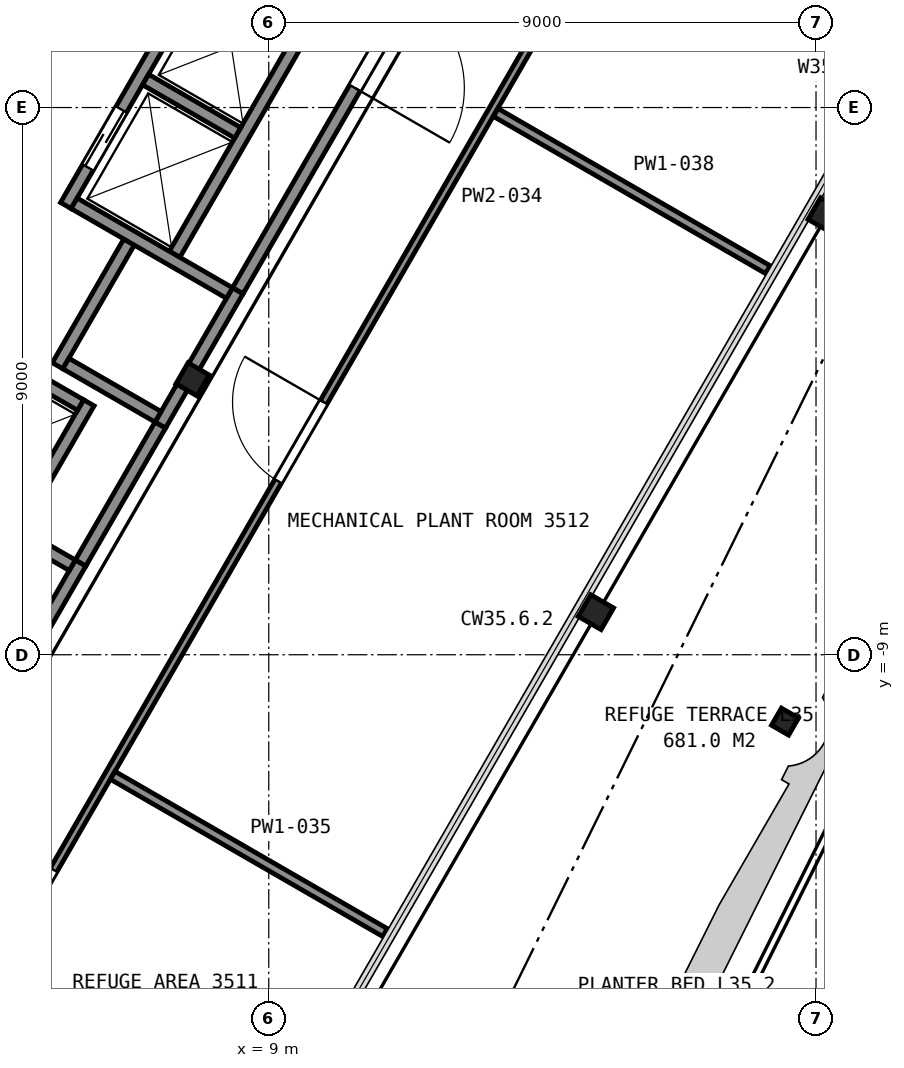
"""IFC4 building model, lengths in metres.
Left out: names, types, materials, properties, quantities, classifications, styles, units other than length and angle.
Written with IfcOpenShell. Run it as: python <this file> out.ifc"""

import sys

from ifc_helpers import new_model, si_unit, direction, frame, frame_2d, origin, origin_2d, place, context, subcontext, project, spatial, rectangle, hollow_circle, i_section, extrude, element, fill, save


model = new_model("IFC4")
c1 = context("Model", 3, precision=1e-05, world=origin(), true_north=direction((0.0, 1.0)))
c2 = subcontext(c1, "Body", "Model", "MODEL_VIEW")
j1 = project(units=[si_unit("LENGTHUNIT", "METRE"), si_unit("PLANEANGLEUNIT", "RADIAN")], contexts=[c1])
p1 = place(None, origin())
s1 = spatial("IfcSite", under=j1, at=p1, CompositionType="ELEMENT")
p2 = place(p1, origin())
s2 = spatial("IfcBuilding", under=s1, at=p2, CompositionType="ELEMENT")
p3 = place(p2, frame((0.0, 0.0, 143.2)))
s3 = spatial("IfcBuildingStorey", under=s2, at=p3, CompositionType="ELEMENT", Elevation=143.2)
for number, where, z_axis, x_axis in (
    (1, (14.38, -8.3, -0.16), (0.0, 0.0, 1.0), (-0.5, -0.866, 0.0)),
    (2, (18.16, -1.77, -0.16), (0.0, 0.0, 1.0), (-0.5, -0.866, 0.0)),
):
    element("IfcColumn", number, at=place(p3, frame(where, z_axis=z_axis, x_axis=x_axis)), inside=s3, PredefinedType="COLUMN", context=c2, shape_type="SweptSolid", body=[
        extrude(i_section(OverallWidth=0.411, OverallDepth=0.434, WebThickness=0.036, FlangeThickness=0.057, FilletRadius=0.015, at=origin_2d()), origin(), (0.0, 0.0, 1.0), 5.76),
    ])
p4 = place(p3, frame((7.963, -4.596, 0.04), z_axis=(-0.18158785929, 0.104740603763, 0.97778078079), x_axis=(0.983190410974, 8.7292444e-05, 0.182583154064)))
e3 = element("IfcColumn", 3, at=p4, inside=s3, PredefinedType="COLUMN", context=c2, shape_type="SweptSolid", body=[
    extrude(i_section(OverallWidth=0.401, OverallDepth=0.399, WebThickness=0.025, FlangeThickness=0.04, FilletRadius=0.015, at=origin_2d()), origin(), (0.0, 0.0, 1.0), 5.646),
])
p5 = place(p3, frame((17.49, -10.1, -0.73), z_axis=(0.0, 0.0, 1.0), x_axis=(-0.5, -0.866025403784, 0.0)))
e4 = element("IfcColumn", 4, at=p5, inside=s3, PredefinedType="COLUMN", context=c2, shape_type="SweptSolid", body=[
    extrude(hollow_circle(Radius=0.163, WallThickness=0.013, at=origin_2d()), origin(), (0.0, 0.0, 1.0), 5.17),
])
p6 = place(p3, frame((4.63, -9.7, 0.0), z_axis=(0.0, 0.0, 1.0), x_axis=(0.500062241894, 0.865989465428, 0.0)))
e5 = element("IfcWall", 5, at=p6, inside=s3, PredefinedType="PARTITIONING", context=c2, shape_type="SweptSolid", body=[
    extrude(rectangle(XDim=2.55, YDim=0.2, at=frame_2d((1.275, 0.0))), origin(), (0.0, 0.0, 1.0), 5.35),
])
p7 = place(p3, frame((7.216, -5.222, 0.0), z_axis=(0.0, 0.0, 1.0), x_axis=(0.499990435942, 0.866030925526, 0.0)))
e6 = element("IfcWall", 6, at=p7, inside=s3, PredefinedType="PARTITIONING", context=c2, shape_type="SweptSolid", body=[
    extrude(rectangle(XDim=2.55, YDim=0.2, at=frame_2d((1.275, 0.0))), origin(), (0.0, 0.0, 1.0), 4.697),
])
p8 = place(p3, frame((4.866, -6.891, 0.0), z_axis=(0.0, 0.0, 1.0), x_axis=(0.500016218704, 0.866016039709, 0.0)))
e7 = element("IfcWall", 7, at=p8, inside=s3, PredefinedType="PARTITIONING", context=c2, shape_type="SweptSolid", body=[
    extrude(rectangle(XDim=2.35, YDim=0.2, at=frame_2d((1.175, 0.0))), origin(), (0.0, 0.0, 1.0), 5.6),
])
p9 = place(p3, frame((7.451, -2.414, 0.0), z_axis=(0.0, 0.0, 1.0), x_axis=(0.500016218704, 0.866016039709, 0.0)))
e8 = element("IfcWall", 8, at=p9, inside=s3, PredefinedType="PARTITIONING", context=c2, shape_type="SweptSolid", body=[
    extrude(rectangle(XDim=4.7, YDim=0.2, at=frame_2d((2.35, 0.0))), origin(), (0.0, 0.0, 1.0), 5.6),
])
p10 = place(p3, frame((5.527, -4.247, 0.0), z_axis=(0.0, 0.0, 1.0), x_axis=(0.499938297808, 0.866061024631, 0.0)))
e9 = element("IfcWall", 9, at=p10, inside=s3, PredefinedType="PARTITIONING", context=c2, shape_type="SweptSolid", body=[
    extrude(rectangle(XDim=2.35, YDim=0.2, at=frame_2d((1.175, 0.0))), origin(), (0.0, 0.0, 1.0), 5.35),
])
p11 = place(p3, frame((5.663, -1.612, 0.0), z_axis=(0.0, 0.0, 1.0), x_axis=(0.49998122708, 0.866036242063, 0.0)))
e10 = element("IfcWall", 10, at=p11, inside=s3, PredefinedType="PARTITIONING", context=c2, shape_type="SweptSolid", body=[
    extrude(rectangle(XDim=4.9, YDim=0.2, at=frame_2d((2.45, 0.0))), origin(), (0.0, 0.0, 1.0), 5.6),
])
p12 = place(p11, frame((3.075, 0.0, 0.0)))
e11 = element("IfcOpeningElement", 11, at=p12, cuts=e10, PredefinedType="OPENING", context=c2, shape_type="SweptSolid", body=[
    extrude(rectangle(XDim=1.1, YDim=2.1, at=frame_2d((0.55, 1.05))), frame((0.0, 0.11, 0.0), z_axis=(0.0, -1.0, 0.0), x_axis=(1.0, 0.0, 0.0)), (0.0, 0.0, 1.0), 0.22),
])
p13 = place(p11, frame((0.725, 0.0, 0.0)))
e12 = element("IfcOpeningElement", 12, at=p13, cuts=e10, PredefinedType="OPENING", context=c2, shape_type="SweptSolid", body=[
    extrude(rectangle(XDim=1.1, YDim=2.1, at=frame_2d((0.55, 1.05))), frame((0.0, 0.11, 0.0), z_axis=(0.0, -1.0, 0.0), x_axis=(1.0, 0.0, 0.0)), (0.0, 0.0, 1.0), 0.22),
])
p14 = place(p3, frame((8.49, -0.416, 0.0), z_axis=(0.0, 0.0, 1.0), x_axis=(-0.866036909293, 0.499980071345, 0.0)))
e13 = element("IfcWall", 13, at=p14, inside=s3, PredefinedType="PARTITIONING", context=c2, shape_type="SweptSolid", body=[
    extrude(rectangle(XDim=1.75, YDim=0.2, at=frame_2d((0.875, 0.0))), origin(), (0.0, 0.0, 1.0), 5.6),
])
p15 = place(p3, frame((8.354, -3.051, 0.0), z_axis=(0.0, 0.0, 1.0), x_axis=(-0.866060182126, 0.499939757307, 0.0)))
e14 = element("IfcWall", 14, at=p15, inside=s3, PredefinedType="PARTITIONING", context=c2, shape_type="SweptSolid", body=[
    extrude(rectangle(XDim=2.95, YDim=0.2, at=frame_2d((1.475, 0.0))), origin(), (0.0, 0.0, 1.0), 4.733),
])
p16 = place(p3, frame((7.179, -5.086, 0.0), z_axis=(0.0, 0.0, 1.0), x_axis=(-0.866036909293, 0.499980071345, 0.0)))
e15 = element("IfcWall", 15, at=p16, inside=s3, PredefinedType="PARTITIONING", context=c2, shape_type="SweptSolid", body=[
    extrude(rectangle(XDim=1.75, YDim=0.2, at=frame_2d((0.875, 0.0))), origin(), (0.0, 0.0, 1.0), 4.733),
])
p17 = place(p3, frame((5.905, -4.893, 0.0), z_axis=(0.0, 0.0, 1.0), x_axis=(-0.866002029911, 0.500040482552, 0.0)))
e16 = element("IfcWall", 16, at=p17, inside=s3, PredefinedType="PARTITIONING", context=c2, shape_type="SweptSolid", body=[
    extrude(rectangle(XDim=1.75, YDim=0.2, at=frame_2d((0.875, 0.0))), origin(), (0.0, 0.0, 1.0), 5.6),
])
p18 = place(p3, frame((5.769, -7.528, 0.0), z_axis=(0.0, 0.0, 1.0), x_axis=(-0.866003658127, 0.500037662692, 0.0)))
e17 = element("IfcWall", 17, at=p18, inside=s3, PredefinedType="PARTITIONING", context=c2, shape_type="SweptSolid", body=[
    extrude(rectangle(XDim=2.95, YDim=0.2, at=frame_2d((1.475, 0.0))), origin(), (0.0, 0.0, 1.0), 4.733),
])
p19 = place(p3, frame((5.906, -7.49, 0.0), z_axis=(0.0, 0.0, 1.0), x_axis=(0.500252727967, 0.865879442048, 0.0)))
e18 = element("IfcWall", 18, at=p19, inside=s3, PredefinedType="PARTITIONING", context=c2, shape_type="SweptSolid", body=[
    extrude(rectangle(XDim=2.617, YDim=0.2, at=frame_2d((1.309, 0.0))), origin(), (0.0, 0.0, 1.0), 5.35),
])
p20 = place(p3, frame((8.492, -3.012, 0.0), z_axis=(0.0, 0.0, 1.0), x_axis=(0.499972957231, 0.866041016371, 0.0)))
e19 = element("IfcWall", 19, at=p20, inside=s3, PredefinedType="PARTITIONING", context=c2, shape_type="SweptSolid", body=[
    extrude(rectangle(XDim=10.349, YDim=0.2, at=frame_2d((5.174, 0.0))), origin(), (0.0, 0.0, 1.0), 4.697),
])
p21 = place(p20, frame((3.85, 0.0, 0.0)))
e20 = element("IfcOpeningElement", 20, at=p21, cuts=e19, PredefinedType="OPENING", context=c2, shape_type="SweptSolid", body=[
    extrude(rectangle(XDim=1.8, YDim=2.1, at=frame_2d((0.9, 1.05))), frame((0.0, 0.11, 0.0), z_axis=(0.0, -1.0, 0.0), x_axis=(1.0, 0.0, 0.0)), (0.0, 0.0, 1.0), 0.22),
])
p22 = place(p3, frame((15.684, 5.165, 0.0), z_axis=(0.0, 0.0, 1.0), x_axis=(-0.500027787016, -0.866009360349, 0.0)))
e21 = element("IfcWall", 21, at=p22, inside=s3, PredefinedType="PARTITIONING", context=c2, shape_type="SweptSolid", body=[
    extrude(rectangle(XDim=23.856, YDim=0.125, at=frame_2d((11.928, 0.0))), origin(), (0.0, 0.0, 1.0), 4.262),
])
p23 = place(p22, frame((20.443, 0.0, 0.0)))
e22 = element("IfcOpeningElement", 22, at=p23, cuts=e21, PredefinedType="OPENING", context=c2, shape_type="SweptSolid", body=[
    extrude(rectangle(XDim=1.5, YDim=2.1, at=frame_2d((0.75, 1.05))), frame((0.0, 0.073, 0.0), z_axis=(0.0, -1.0, 0.0), x_axis=(1.0, 0.0, 0.0)), (0.0, 0.0, 1.0), 0.145),
])
p24 = place(p22, frame((11.56, 0.0, 0.0)))
e23 = element("IfcOpeningElement", 23, at=p24, cuts=e21, PredefinedType="OPENING", context=c2, shape_type="SweptSolid", body=[
    extrude(rectangle(XDim=1.5, YDim=2.1, at=frame_2d((0.75, 1.05))), frame((0.0, 0.073, 0.0), z_axis=(0.0, -1.0, 0.0), x_axis=(1.0, 0.0, 0.0)), (0.0, 0.0, 1.0), 0.145),
])
p25 = place(p22, frame((2.27, 0.0, 0.0)))
e24 = element("IfcOpeningElement", 24, at=p25, cuts=e21, PredefinedType="OPENING", context=c2, shape_type="SweptSolid", body=[
    extrude(rectangle(XDim=1.5, YDim=2.1, at=frame_2d((0.75, 1.05))), frame((0.0, 0.073, 0.0), z_axis=(0.0, -1.0, 0.0), x_axis=(1.0, 0.0, 0.0)), (0.0, 0.0, 1.0), 0.145),
])
p26 = place(p3, frame((6.433, -10.983, 0.0), z_axis=(0.0, 0.0, 1.0), x_axis=(0.866006353889, -0.500032993936, 0.0)))
e25 = element("IfcWall", 25, at=p26, inside=s3, PredefinedType="PARTITIONING", context=c2, shape_type="SweptSolid", body=[
    extrude(rectangle(XDim=5.172, YDim=0.15, at=frame_2d((2.586, 0.0))), origin(), (0.0, 0.0, 1.0), 4.262),
])
p27 = place(p3, frame((12.732, -0.082, 0.0), z_axis=(0.0, 0.0, 1.0), x_axis=(0.865989662226, -0.500061901086, 0.0)))
e26 = element("IfcWall", 26, at=p27, inside=s3, PredefinedType="PARTITIONING", context=c2, shape_type="SweptSolid", body=[
    extrude(rectangle(XDim=5.167, YDim=0.15, at=frame_2d((2.583, 0.0))), origin(), (0.0, 0.0, 1.0), 4.262),
])
p28 = place(p13, origin())
e27 = element("IfcDoor", 27, at=p28, inside=s3, OperationType="SLIDING_TO_LEFT", PredefinedType="DOOR", context=c2, shape_type="SweptSolid", body=[
    extrude(rectangle(XDim=1.1, YDim=2.1, at=frame_2d((0.55, 1.05))), frame((0.0, 0.025, 0.0), z_axis=(0.0, -1.0, 0.0), x_axis=(1.0, 0.0, 0.0)), (0.0, 0.0, 1.0), 0.05),
])
fill(e12, e27)
p29 = place(p21, origin())
e28 = element("IfcDoor", 28, at=p29, inside=s3, OperationType="DOUBLE_DOOR_SINGLE_SWING", PredefinedType="DOOR", context=c2, shape_type="SweptSolid", body=[
    extrude(rectangle(XDim=1.8, YDim=2.1, at=frame_2d((0.9, 1.05))), frame((0.0, 0.025, 0.0), z_axis=(0.0, -1.0, 0.0), x_axis=(1.0, 0.0, 0.0)), (0.0, 0.0, 1.0), 0.05),
])
fill(e20, e28)
p30 = place(p23, origin())
e29 = element("IfcDoor", 29, at=p30, inside=s3, OperationType="DOUBLE_DOOR_SINGLE_SWING", PredefinedType="DOOR", context=c2, shape_type="SweptSolid", body=[
    extrude(rectangle(XDim=1.5, YDim=2.1, at=frame_2d((0.75, 1.05))), frame((0.0, 0.025, 0.0), z_axis=(0.0, -1.0, 0.0), x_axis=(1.0, 0.0, 0.0)), (0.0, 0.0, 1.0), 0.05),
])
fill(e22, e29)
p31 = place(p24, origin())
e30 = element("IfcDoor", 30, at=p31, inside=s3, OperationType="DOUBLE_DOOR_SINGLE_SWING", PredefinedType="DOOR", context=c2, shape_type="SweptSolid", body=[
    extrude(rectangle(XDim=1.5, YDim=2.1, at=frame_2d((0.75, 1.05))), frame((0.0, 0.025, 0.0), z_axis=(0.0, -1.0, 0.0), x_axis=(1.0, 0.0, 0.0)), (0.0, 0.0, 1.0), 0.05),
])
fill(e23, e30)
save(model, sys.argv[1])
